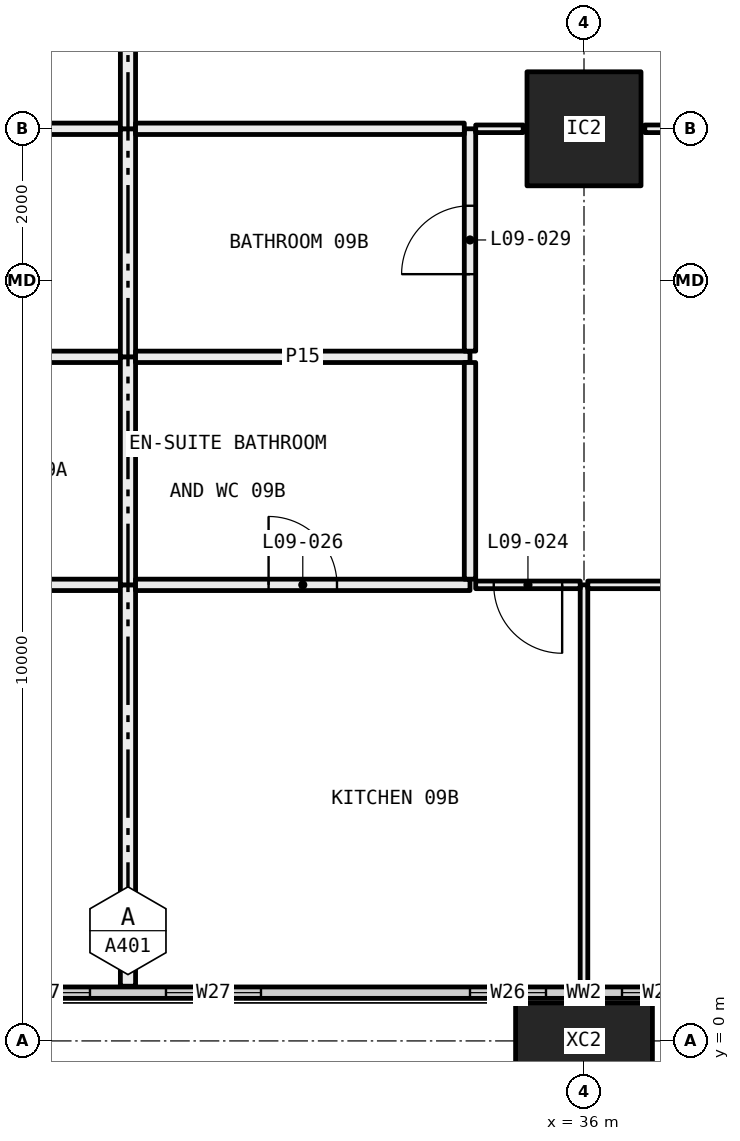
"""IFC4 building model, lengths in metres.
Left out: names, types, materials, properties, quantities, classifications, styles, units other than length and angle.
Written with IfcOpenShell. Run it as: python <this file> out.ifc"""

import sys

from ifc_helpers import new_model, si_unit, direction, frame, frame_2d, origin, origin_2d, place, context, subcontext, project, spatial, rectangle, hollow_rectangle, extrude, element, fill, save


model = new_model("IFC4")
c1 = context("Model", 3, precision=1e-05, world=origin(), true_north=direction((0.0, 1.0)))
c2 = subcontext(c1, "Body", "Model", "MODEL_VIEW")
j1 = project(units=[si_unit("LENGTHUNIT", "METRE"), si_unit("PLANEANGLEUNIT", "RADIAN")], contexts=[c1])
p1 = place(None, origin())
s1 = spatial("IfcSite", under=j1, at=p1, CompositionType="ELEMENT")
p2 = place(p1, origin())
s2 = spatial("IfcBuilding", under=s1, at=p2, CompositionType="ELEMENT")
p3 = place(p2, frame((0.0, 0.0, 43.8)))
s3 = spatial("IfcBuildingStorey", under=s2, at=p3, CompositionType="ELEMENT", Elevation=43.8)
p4 = place(p3, frame((36.0, 0.0, -0.4), z_axis=(0.0, 0.0, 1.0), x_axis=(1.0, 0.0, 0.0)))
e1 = element("IfcColumn", 1, at=p4, inside=s3, PredefinedType="COLUMN", context=c2, shape_type="SweptSolid", body=[
    extrude(hollow_rectangle(XDim=1.8, YDim=1.0, WallThickness=0.07, at=origin_2d()), origin(), (0.0, 0.0, 1.0), 3.45),
])
p5 = place(p3, frame((36.0, 12.0, 0.0), z_axis=(0.0, 0.0, 1.0), x_axis=(1.0, 0.0, 0.0)))
e2 = element("IfcColumn", 2, at=p5, inside=s3, PredefinedType="COLUMN", context=c2, shape_type="SweptSolid", body=[
    extrude(hollow_rectangle(XDim=1.5, YDim=1.5, WallThickness=0.065, at=origin_2d()), origin(), (0.0, 0.0, 1.0), 3.05),
])
p6 = place(p3, frame((6.56, 0.635, 0.0), z_axis=(0.0, 0.0, 1.0), x_axis=(1.0, 0.0, 0.0)))
e3 = element("IfcWall", 3, at=p6, inside=s3, PredefinedType="ELEMENTEDWALL", context=c2, shape_type="SweptSolid", body=[
    extrude(rectangle(XDim=58.88, YDim=0.15, at=frame_2d((29.44, 0.0))), origin(), (0.0, 0.0, 1.0), 3.05),
])
p7 = place(p6, frame((0.44, 0.0, 0.45)))
e4 = element("IfcOpeningElement", 4, at=p7, cuts=e3, PredefinedType="OPENING", context=c2, shape_type="SweptSolid", body=[
    extrude(rectangle(XDim=4.5, YDim=2.55, at=frame_2d((2.25, 1.275))), frame((0.0, 0.085, 0.0), z_axis=(0.0, -1.0, 0.0), x_axis=(1.0, 0.0, 0.0)), (0.0, 0.0, 1.0), 0.17),
])
p8 = place(p6, frame((5.94, 0.0, 0.45)))
e5 = element("IfcOpeningElement", 5, at=p8, cuts=e3, PredefinedType="OPENING", context=c2, shape_type="SweptSolid", body=[
    extrude(rectangle(XDim=1.0, YDim=2.55, at=frame_2d((0.5, 1.275))), frame((0.0, 0.085, 0.0), z_axis=(0.0, -1.0, 0.0), x_axis=(1.0, 0.0, 0.0)), (0.0, 0.0, 1.0), 0.17),
])
p9 = place(p6, frame((9.69, 0.0, 0.45)))
e6 = element("IfcOpeningElement", 6, at=p9, cuts=e3, PredefinedType="OPENING", context=c2, shape_type="SweptSolid", body=[
    extrude(rectangle(XDim=1.25, YDim=2.55, at=frame_2d((0.625, 1.275))), frame((0.0, 0.085, 0.0), z_axis=(0.0, -1.0, 0.0), x_axis=(1.0, 0.0, 0.0)), (0.0, 0.0, 1.0), 0.17),
])
p10 = place(p6, frame((11.94, 0.0, 0.45)))
e7 = element("IfcOpeningElement", 7, at=p10, cuts=e3, PredefinedType="OPENING", context=c2, shape_type="SweptSolid", body=[
    extrude(rectangle(XDim=1.25, YDim=2.55, at=frame_2d((0.625, 1.275))), frame((0.0, 0.085, 0.0), z_axis=(0.0, -1.0, 0.0), x_axis=(1.0, 0.0, 0.0)), (0.0, 0.0, 1.0), 0.17),
])
p11 = place(p6, frame((15.94, 0.0, 0.45)))
e8 = element("IfcOpeningElement", 8, at=p11, cuts=e3, PredefinedType="OPENING", context=c2, shape_type="SweptSolid", body=[
    extrude(rectangle(XDim=1.0, YDim=2.55, at=frame_2d((0.5, 1.275))), frame((0.0, 0.085, 0.0), z_axis=(0.0, -1.0, 0.0), x_axis=(1.0, 0.0, 0.0)), (0.0, 0.0, 1.0), 0.17),
])
p12 = place(p6, frame((17.94, 0.0, 0.45)))
e9 = element("IfcOpeningElement", 9, at=p12, cuts=e3, PredefinedType="OPENING", context=c2, shape_type="SweptSolid", body=[
    extrude(rectangle(XDim=1.0, YDim=2.55, at=frame_2d((0.5, 1.275))), frame((0.0, 0.085, 0.0), z_axis=(0.0, -1.0, 0.0), x_axis=(1.0, 0.0, 0.0)), (0.0, 0.0, 1.0), 0.17),
])
p13 = place(p6, frame((21.69, 0.0, 0.45)))
e10 = element("IfcOpeningElement", 10, at=p13, cuts=e3, PredefinedType="OPENING", context=c2, shape_type="SweptSolid", body=[
    extrude(rectangle(XDim=1.25, YDim=2.55, at=frame_2d((0.625, 1.275))), frame((0.0, 0.085, 0.0), z_axis=(0.0, -1.0, 0.0), x_axis=(1.0, 0.0, 0.0)), (0.0, 0.0, 1.0), 0.17),
])
p14 = place(p6, frame((23.94, 0.0, 0.45)))
e11 = element("IfcOpeningElement", 11, at=p14, cuts=e3, PredefinedType="OPENING", context=c2, shape_type="SweptSolid", body=[
    extrude(rectangle(XDim=1.25, YDim=2.55, at=frame_2d((0.625, 1.275))), frame((0.0, 0.085, 0.0), z_axis=(0.0, -1.0, 0.0), x_axis=(1.0, 0.0, 0.0)), (0.0, 0.0, 1.0), 0.17),
])
p15 = place(p6, frame((27.94, 0.0, 0.45)))
e12 = element("IfcOpeningElement", 12, at=p15, cuts=e3, PredefinedType="OPENING", context=c2, shape_type="SweptSolid", body=[
    extrude(rectangle(XDim=1.0, YDim=2.55, at=frame_2d((0.5, 1.275))), frame((0.0, 0.085, 0.0), z_axis=(0.0, -1.0, 0.0), x_axis=(1.0, 0.0, 0.0)), (0.0, 0.0, 1.0), 0.17),
])
p16 = place(p6, frame((29.94, 0.0, 0.45)))
e13 = element("IfcOpeningElement", 13, at=p16, cuts=e3, PredefinedType="OPENING", context=c2, shape_type="SweptSolid", body=[
    extrude(rectangle(XDim=1.0, YDim=2.55, at=frame_2d((0.5, 1.275))), frame((0.0, 0.085, 0.0), z_axis=(0.0, -1.0, 0.0), x_axis=(1.0, 0.0, 0.0)), (0.0, 0.0, 1.0), 0.17),
])
p17 = place(p6, frame((33.69, 0.0, 0.45)))
e14 = element("IfcOpeningElement", 14, at=p17, cuts=e3, PredefinedType="OPENING", context=c2, shape_type="SweptSolid", body=[
    extrude(rectangle(XDim=1.25, YDim=2.55, at=frame_2d((0.625, 1.275))), frame((0.0, 0.085, 0.0), z_axis=(0.0, -1.0, 0.0), x_axis=(1.0, 0.0, 0.0)), (0.0, 0.0, 1.0), 0.17),
])
p18 = place(p6, frame((35.94, 0.0, 0.45)))
e15 = element("IfcOpeningElement", 15, at=p18, cuts=e3, PredefinedType="OPENING", context=c2, shape_type="SweptSolid", body=[
    extrude(rectangle(XDim=1.25, YDim=2.55, at=frame_2d((0.625, 1.275))), frame((0.0, 0.085, 0.0), z_axis=(0.0, -1.0, 0.0), x_axis=(1.0, 0.0, 0.0)), (0.0, 0.0, 1.0), 0.17),
])
p19 = place(p6, frame((39.94, 0.0, 0.45)))
e16 = element("IfcOpeningElement", 16, at=p19, cuts=e3, PredefinedType="OPENING", context=c2, shape_type="SweptSolid", body=[
    extrude(rectangle(XDim=1.0, YDim=2.55, at=frame_2d((0.5, 1.275))), frame((0.0, 0.085, 0.0), z_axis=(0.0, -1.0, 0.0), x_axis=(1.0, 0.0, 0.0)), (0.0, 0.0, 1.0), 0.17),
])
p20 = place(p6, frame((41.94, 0.0, 0.45)))
e17 = element("IfcOpeningElement", 17, at=p20, cuts=e3, PredefinedType="OPENING", context=c2, shape_type="SweptSolid", body=[
    extrude(rectangle(XDim=1.0, YDim=2.55, at=frame_2d((0.5, 1.275))), frame((0.0, 0.085, 0.0), z_axis=(0.0, -1.0, 0.0), x_axis=(1.0, 0.0, 0.0)), (0.0, 0.0, 1.0), 0.17),
])
p21 = place(p6, frame((45.69, 0.0, 0.45)))
e18 = element("IfcOpeningElement", 18, at=p21, cuts=e3, PredefinedType="OPENING", context=c2, shape_type="SweptSolid", body=[
    extrude(rectangle(XDim=1.25, YDim=2.55, at=frame_2d((0.625, 1.275))), frame((0.0, 0.085, 0.0), z_axis=(0.0, -1.0, 0.0), x_axis=(1.0, 0.0, 0.0)), (0.0, 0.0, 1.0), 0.17),
])
p22 = place(p6, frame((47.94, 0.0, 0.45)))
e19 = element("IfcOpeningElement", 19, at=p22, cuts=e3, PredefinedType="OPENING", context=c2, shape_type="SweptSolid", body=[
    extrude(rectangle(XDim=1.25, YDim=2.55, at=frame_2d((0.625, 1.275))), frame((0.0, 0.085, 0.0), z_axis=(0.0, -1.0, 0.0), x_axis=(1.0, 0.0, 0.0)), (0.0, 0.0, 1.0), 0.17),
])
p23 = place(p6, frame((51.94, 0.0, 0.45)))
e20 = element("IfcOpeningElement", 20, at=p23, cuts=e3, PredefinedType="OPENING", context=c2, shape_type="SweptSolid", body=[
    extrude(rectangle(XDim=1.0, YDim=2.55, at=frame_2d((0.5, 1.275))), frame((0.0, 0.085, 0.0), z_axis=(0.0, -1.0, 0.0), x_axis=(1.0, 0.0, 0.0)), (0.0, 0.0, 1.0), 0.17),
])
p24 = place(p6, frame((53.94, 0.0, 0.45)))
e21 = element("IfcOpeningElement", 21, at=p24, cuts=e3, PredefinedType="OPENING", context=c2, shape_type="SweptSolid", body=[
    extrude(rectangle(XDim=4.5, YDim=2.55, at=frame_2d((2.25, 1.275))), frame((0.0, 0.085, 0.0), z_axis=(0.0, -1.0, 0.0), x_axis=(1.0, 0.0, 0.0)), (0.0, 0.0, 1.0), 0.17),
])
p25 = place(p3, frame((29.9, 6.0, 0.0), z_axis=(0.0, 0.0, 1.0), x_axis=(-1.0, 0.0, 0.0)))
e22 = element("IfcWall", 22, at=p25, inside=s3, PredefinedType="PARTITIONING", context=c2, shape_type="SweptSolid", body=[
    extrude(rectangle(XDim=4.4, YDim=0.15, at=frame_2d((2.2, 0.0))), origin(), (0.0, 0.0, 1.0), 3.05),
])
p26 = place(p3, frame((30.0, 0.72, 0.0), z_axis=(0.0, 0.0, 1.0), x_axis=(0.0, 1.0, 0.0)))
e23 = element("IfcWall", 23, at=p26, inside=s3, PredefinedType="PARTITIONING", context=c2, shape_type="SweptSolid", body=[
    extrude(rectangle(XDim=5.28, YDim=0.2, at=frame_2d((2.64, 0.0))), origin(), (0.0, 0.0, 1.0), 3.05),
])
p27 = place(p3, frame((29.9, 9.0, 0.0), z_axis=(0.0, 0.0, 1.0), x_axis=(-1.0, 0.0, 0.0)))
e24 = element("IfcWall", 24, at=p27, inside=s3, PredefinedType="PARTITIONING", context=c2, shape_type="SweptSolid", body=[
    extrude(rectangle(XDim=4.325, YDim=0.15, at=frame_2d((2.163, 0.0))), origin(), (0.0, 0.0, 1.0), 3.05),
])
p28 = place(p3, frame((30.0, 6.0, 0.0), z_axis=(0.0, 0.0, 1.0), x_axis=(0.0, 1.0, 0.0)))
e25 = element("IfcWall", 25, at=p28, inside=s3, PredefinedType="PARTITIONING", context=c2, shape_type="SweptSolid", body=[
    extrude(rectangle(XDim=3.0, YDim=0.2, at=frame_2d((1.5, 0.0))), origin(), (0.0, 0.0, 1.0), 3.05),
])
p29 = place(p3, frame((29.9, 12.0, 0.0), z_axis=(0.0, 0.0, 1.0), x_axis=(-1.0, 0.0, 0.0)))
e26 = element("IfcWall", 26, at=p29, inside=s3, PredefinedType="PARTITIONING", context=c2, shape_type="SweptSolid", body=[
    extrude(rectangle(XDim=4.325, YDim=0.15, at=frame_2d((2.163, 0.0))), origin(), (0.0, 0.0, 1.0), 2.45),
])
p30 = place(p3, frame((30.0, 9.0, 0.0), z_axis=(0.0, 0.0, 1.0), x_axis=(0.0, 1.0, 0.0)))
e27 = element("IfcWall", 27, at=p30, inside=s3, PredefinedType="PARTITIONING", context=c2, shape_type="SweptSolid", body=[
    extrude(rectangle(XDim=3.0, YDim=0.2, at=frame_2d((1.5, 0.0))), origin(), (0.0, 0.0, 1.0), 2.45),
])
p31 = place(p3, frame((30.0, 12.0, 0.0), z_axis=(0.0, 0.0, 1.0), x_axis=(0.0, 1.0, 0.0)))
e28 = element("IfcWall", 28, at=p31, inside=s3, PredefinedType="PARTITIONING", context=c2, shape_type="SweptSolid", body=[
    extrude(rectangle(XDim=6.0, YDim=0.2, at=frame_2d((3.0, 0.0))), origin(), (0.0, 0.0, 1.0), 2.45),
])
p32 = place(p3, frame((36.0, 0.72, 0.0), z_axis=(0.0, 0.0, 1.0), x_axis=(0.0, 1.0, 0.0)))
e29 = element("IfcWall", 29, at=p32, inside=s3, PredefinedType="PARTITIONING", context=c2, shape_type="SweptSolid", body=[
    extrude(rectangle(XDim=5.28, YDim=0.1, at=frame_2d((2.64, 0.0))), origin(), (0.0, 0.0, 1.0), 2.45),
])
p33 = place(p3, frame((34.5, 6.0, 0.0), z_axis=(0.0, 0.0, 1.0), x_axis=(-1.0, 0.0, 0.0)))
e30 = element("IfcWall", 30, at=p33, inside=s3, PredefinedType="PARTITIONING", context=c2, shape_type="SweptSolid", body=[
    extrude(rectangle(XDim=4.4, YDim=0.15, at=frame_2d((2.2, 0.0))), origin(), (0.0, 0.0, 1.0), 3.05),
])
p34 = place(p33, frame((1.75, 0.0, 0.0)))
e31 = element("IfcOpeningElement", 31, at=p34, cuts=e30, PredefinedType="OPENING", context=c2, shape_type="SweptSolid", body=[
    extrude(rectangle(XDim=0.9, YDim=2.1, at=frame_2d((0.45, 1.05))), frame((0.0, 0.085, 0.0), z_axis=(0.0, -1.0, 0.0), x_axis=(1.0, 0.0, 0.0)), (0.0, 0.0, 1.0), 0.17),
])
p35 = place(p3, frame((35.95, 6.0, 0.0), z_axis=(0.0, 0.0, 1.0), x_axis=(-1.0, 0.0, 0.0)))
e32 = element("IfcWall", 32, at=p35, inside=s3, PredefinedType="PARTITIONING", context=c2, shape_type="SweptSolid", body=[
    extrude(rectangle(XDim=1.375, YDim=0.1, at=frame_2d((0.688, 0.0))), origin(), (0.0, 0.0, 1.0), 2.45),
])
p36 = place(p35, frame((0.238, 0.0, 0.0)))
e33 = element("IfcOpeningElement", 33, at=p36, cuts=e32, PredefinedType="OPENING", context=c2, shape_type="SweptSolid", body=[
    extrude(rectangle(XDim=0.9, YDim=2.1, at=frame_2d((0.45, 1.05))), frame((0.0, 0.06, 0.0), z_axis=(0.0, -1.0, 0.0), x_axis=(1.0, 0.0, 0.0)), (0.0, 0.0, 1.0), 0.12),
])
p37 = place(p3, frame((41.95, 6.0, 0.0), z_axis=(0.0, 0.0, 1.0), x_axis=(-1.0, 0.0, 0.0)))
e34 = element("IfcWall", 34, at=p37, inside=s3, PredefinedType="PARTITIONING", context=c2, shape_type="SweptSolid", body=[
    extrude(rectangle(XDim=5.9, YDim=0.1, at=frame_2d((2.95, 0.0))), origin(), (0.0, 0.0, 1.0), 2.45),
])
p38 = place(p3, frame((34.5, 9.0, 0.0), z_axis=(0.0, 0.0, 1.0), x_axis=(-1.0, 0.0, 0.0)))
e35 = element("IfcWall", 35, at=p38, inside=s3, PredefinedType="PARTITIONING", context=c2, shape_type="SweptSolid", body=[
    extrude(rectangle(XDim=4.4, YDim=0.15, at=frame_2d((2.2, 0.0))), origin(), (0.0, 0.0, 1.0), 3.05),
])
p39 = place(p3, frame((34.5, 6.075, 0.0), z_axis=(0.0, 0.0, 1.0), x_axis=(0.0, 1.0, 0.0)))
e36 = element("IfcWall", 36, at=p39, inside=s3, PredefinedType="PARTITIONING", context=c2, shape_type="SweptSolid", body=[
    extrude(rectangle(XDim=2.85, YDim=0.15, at=frame_2d((1.425, 0.0))), origin(), (0.0, 0.0, 1.0), 3.05),
])
p40 = place(p3, frame((34.5, 9.075, 0.0), z_axis=(0.0, 0.0, 1.0), x_axis=(0.0, 1.0, 0.0)))
e37 = element("IfcWall", 37, at=p40, inside=s3, PredefinedType="PARTITIONING", context=c2, shape_type="SweptSolid", body=[
    extrude(rectangle(XDim=2.925, YDim=0.15, at=frame_2d((1.462, 0.0))), origin(), (0.0, 0.0, 1.0), 2.45),
])
p41 = place(p40, frame((1.012, 0.0, 0.0)))
e38 = element("IfcOpeningElement", 38, at=p41, cuts=e37, PredefinedType="OPENING", context=c2, shape_type="SweptSolid", body=[
    extrude(rectangle(XDim=0.9, YDim=2.1, at=frame_2d((0.45, 1.05))), frame((0.0, 0.085, 0.0), z_axis=(0.0, -1.0, 0.0), x_axis=(1.0, 0.0, 0.0)), (0.0, 0.0, 1.0), 0.17),
])
p42 = place(p3, frame((34.425, 12.0, 0.0), z_axis=(0.0, 0.0, 1.0), x_axis=(-1.0, 0.0, 0.0)))
e39 = element("IfcWall", 39, at=p42, inside=s3, PredefinedType="PARTITIONING", context=c2, shape_type="SweptSolid", body=[
    extrude(rectangle(XDim=4.325, YDim=0.15, at=frame_2d((2.163, 0.0))), origin(), (0.0, 0.0, 1.0), 2.45),
])
p43 = place(p3, frame((35.2, 12.0, 0.0), z_axis=(0.0, 0.0, 1.0), x_axis=(-1.0, 0.0, 0.0)))
e40 = element("IfcWall", 40, at=p43, inside=s3, PredefinedType="PARTITIONING", context=c2, shape_type="SweptSolid", body=[
    extrude(rectangle(XDim=0.625, YDim=0.1, at=frame_2d((0.312, 0.0))), origin(), (0.0, 0.0, 1.0), 2.45),
])
p44 = place(p3, frame((39.0, 12.0, 0.0), z_axis=(0.0, 0.0, 1.0), x_axis=(-1.0, 0.0, 0.0)))
e41 = element("IfcWall", 41, at=p44, inside=s3, PredefinedType="PARTITIONING", context=c2, shape_type="SweptSolid", body=[
    extrude(rectangle(XDim=2.2, YDim=0.1, at=frame_2d((1.1, 0.0))), origin(), (0.0, 0.0, 1.0), 2.45),
])
p45 = place(p44, frame((0.65, 0.0, 0.0)))
e42 = element("IfcOpeningElement", 42, at=p45, cuts=e41, PredefinedType="OPENING", context=c2, shape_type="SweptSolid", body=[
    extrude(rectangle(XDim=0.9, YDim=2.1, at=frame_2d((0.45, 1.05))), frame((0.0, 0.06, 0.0), z_axis=(0.0, -1.0, 0.0), x_axis=(1.0, 0.0, 0.0)), (0.0, 0.0, 1.0), 0.12),
])
p46 = place(p13, origin())
e43 = element("IfcWindow", 43, at=p46, inside=s3, PartitioningType="SINGLE_PANEL", PredefinedType="WINDOW", context=c2, shape_type="SweptSolid", body=[
    extrude(rectangle(XDim=1.25, YDim=2.55, at=frame_2d((0.625, 1.275))), frame((0.0, 0.03, 0.0), z_axis=(0.0, -1.0, 0.0), x_axis=(1.0, 0.0, 0.0)), (0.0, 0.0, 1.0), 0.06),
])
fill(e10, e43)
p47 = place(p14, origin())
e44 = element("IfcWindow", 44, at=p47, inside=s3, PartitioningType="SINGLE_PANEL", PredefinedType="WINDOW", context=c2, shape_type="SweptSolid", body=[
    extrude(rectangle(XDim=1.25, YDim=2.55, at=frame_2d((0.625, 1.275))), frame((0.0, 0.03, 0.0), z_axis=(0.0, -1.0, 0.0), x_axis=(1.0, 0.0, 0.0)), (0.0, 0.0, 1.0), 0.06),
])
fill(e11, e44)
p48 = place(p15, origin())
e45 = element("IfcWindow", 45, at=p48, inside=s3, PartitioningType="SINGLE_PANEL", PredefinedType="WINDOW", context=c2, shape_type="SweptSolid", body=[
    extrude(rectangle(XDim=1.0, YDim=2.55, at=frame_2d((0.5, 1.275))), frame((0.0, 0.03, 0.0), z_axis=(0.0, -1.0, 0.0), x_axis=(1.0, 0.0, 0.0)), (0.0, 0.0, 1.0), 0.06),
])
fill(e12, e45)
p49 = place(p16, origin())
e46 = element("IfcWindow", 46, at=p49, inside=s3, PartitioningType="SINGLE_PANEL", PredefinedType="WINDOW", context=c2, shape_type="SweptSolid", body=[
    extrude(rectangle(XDim=1.0, YDim=2.55, at=frame_2d((0.5, 1.275))), frame((0.0, 0.03, 0.0), z_axis=(0.0, -1.0, 0.0), x_axis=(1.0, 0.0, 0.0)), (0.0, 0.0, 1.0), 0.06),
])
fill(e13, e46)
p50 = place(p36, origin())
e47 = element("IfcDoor", 47, at=p50, inside=s3, OperationType="SINGLE_SWING_RIGHT", PredefinedType="DOOR", context=c2, shape_type="SweptSolid", body=[
    extrude(rectangle(XDim=0.9, YDim=2.1, at=frame_2d((0.45, 1.05))), frame((0.0, 0.025, 0.0), z_axis=(0.0, -1.0, 0.0), x_axis=(1.0, 0.0, 0.0)), (0.0, 0.0, 1.0), 0.05),
])
fill(e33, e47)
p51 = place(p34, frame((0.9, 0.0, 0.0), x_axis=(-1.0, 0.0, 0.0)))
e48 = element("IfcDoor", 48, at=p51, inside=s3, OperationType="SINGLE_SWING_RIGHT", PredefinedType="DOOR", context=c2, shape_type="SweptSolid", body=[
    extrude(rectangle(XDim=0.9, YDim=2.1, at=frame_2d((0.45, 1.05))), frame((0.0, 0.025, 0.0), z_axis=(0.0, -1.0, 0.0), x_axis=(1.0, 0.0, 0.0)), (0.0, 0.0, 1.0), 0.05),
])
fill(e31, e48)
p52 = place(p41, origin())
e49 = element("IfcDoor", 49, at=p52, inside=s3, OperationType="SINGLE_SWING_RIGHT", PredefinedType="DOOR", context=c2, shape_type="SweptSolid", body=[
    extrude(rectangle(XDim=0.9, YDim=2.1, at=frame_2d((0.45, 1.05))), frame((0.0, 0.025, 0.0), z_axis=(0.0, -1.0, 0.0), x_axis=(1.0, 0.0, 0.0)), (0.0, 0.0, 1.0), 0.05),
])
fill(e38, e49)
save(model, sys.argv[1])
